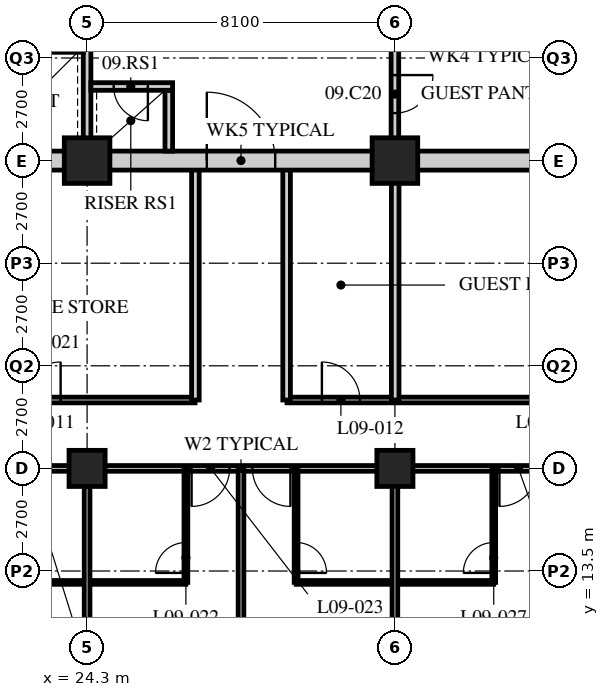
"""IFC4 building model, lengths in metres.
Left out: names, types, materials, properties, quantities, classifications, styles, units other than length and angle.
Written with IfcOpenShell. Run it as: python <this file> out.ifc"""

import sys

from ifc_helpers import new_model, si_unit, direction, frame, frame_2d, origin, origin_2d, place, context, subcontext, project, spatial, rectangle, hollow_rectangle, extrude, element, fill, save


model = new_model("IFC4")
c1 = context("Model", 3, precision=1e-05, world=origin(), true_north=direction((0.0, 1.0)))
c2 = subcontext(c1, "Body", "Model", "MODEL_VIEW")
j1 = project(units=[si_unit("LENGTHUNIT", "METRE"), si_unit("PLANEANGLEUNIT", "RADIAN")], contexts=[c1])
p1 = place(None, origin())
s1 = spatial("IfcSite", under=j1, at=p1, CompositionType="ELEMENT")
p2 = place(p1, origin())
s2 = spatial("IfcBuilding", under=s1, at=p2, CompositionType="ELEMENT")
p3 = place(p2, frame((0.0, 0.0, 43.2)))
s3 = spatial("IfcBuildingStorey", under=s2, at=p3, CompositionType="ELEMENT", Elevation=43.2)
p4 = place(p3, frame((24.3, 16.2, 0.0), z_axis=(0.0, 0.0, 1.0), x_axis=(1.0, 0.0, 0.0)))
e1 = element("IfcColumn", 1, at=p4, inside=s3, PredefinedType="COLUMN", context=c2, shape_type="SweptSolid", body=[
    extrude(hollow_rectangle(XDim=0.95, YDim=0.95, WallThickness=0.095, at=origin_2d()), origin(), (0.0, 0.0, 1.0), 3.4),
])
p5 = place(p3, frame((24.3, 24.3, 0.0), z_axis=(0.0, 0.0, 1.0), x_axis=(1.0, 0.0, 0.0)))
e2 = element("IfcColumn", 2, at=p5, inside=s3, PredefinedType="COLUMN", context=c2, shape_type="SweptSolid", body=[
    extrude(hollow_rectangle(XDim=1.2, YDim=1.2, WallThickness=0.12, at=origin_2d()), origin(), (0.0, 0.0, 1.0), 3.4),
])
p6 = place(p3, frame((32.4, 16.2, 0.0), z_axis=(0.0, 0.0, 1.0), x_axis=(1.0, 0.0, 0.0)))
e3 = element("IfcColumn", 3, at=p6, inside=s3, PredefinedType="COLUMN", context=c2, shape_type="SweptSolid", body=[
    extrude(hollow_rectangle(XDim=0.95, YDim=0.95, WallThickness=0.095, at=origin_2d()), origin(), (0.0, 0.0, 1.0), 3.4),
])
p7 = place(p3, frame((32.4, 24.3, 0.0), z_axis=(0.0, 0.0, 1.0), x_axis=(1.0, 0.0, 0.0)))
e4 = element("IfcColumn", 4, at=p7, inside=s3, PredefinedType="COLUMN", context=c2, shape_type="SweptSolid", body=[
    extrude(hollow_rectangle(XDim=1.2, YDim=1.2, WallThickness=0.12, at=origin_2d()), origin(), (0.0, 0.0, 1.0), 3.4),
])
p8 = place(p3, frame((8.1, 16.2, 0.0), z_axis=(0.0, 0.0, 1.0), x_axis=(1.0, 0.0, 0.0)))
e5 = element("IfcWall", 5, at=p8, inside=s3, PredefinedType="PARTITIONING", context=c2, shape_type="SweptSolid", body=[
    extrude(rectangle(XDim=40.5, YDim=0.15, at=frame_2d((20.25, 0.0))), origin(), (0.0, 0.0, 1.0), 2.578),
])
p9 = place(p8, frame((4.35, 0.0, 0.0)))
e6 = element("IfcOpeningElement", 6, at=p9, cuts=e5, PredefinedType="OPENING", context=c2, shape_type="SweptSolid", body=[
    extrude(rectangle(XDim=1.0, YDim=2.1, at=frame_2d((0.5, 1.05))), frame((0.0, 0.085, 0.0), z_axis=(0.0, -1.0, 0.0), x_axis=(1.0, 0.0, 0.0)), (0.0, 0.0, 1.0), 0.17),
])
p10 = place(p8, frame((10.85, 0.0, 0.0)))
e7 = element("IfcOpeningElement", 7, at=p10, cuts=e5, PredefinedType="OPENING", context=c2, shape_type="SweptSolid", body=[
    extrude(rectangle(XDim=1.0, YDim=2.1, at=frame_2d((0.5, 1.05))), frame((0.0, 0.085, 0.0), z_axis=(0.0, -1.0, 0.0), x_axis=(1.0, 0.0, 0.0)), (0.0, 0.0, 1.0), 0.17),
])
p11 = place(p8, frame((12.75, 0.0, 0.0)))
e8 = element("IfcOpeningElement", 8, at=p11, cuts=e5, PredefinedType="OPENING", context=c2, shape_type="SweptSolid", body=[
    extrude(rectangle(XDim=1.0, YDim=2.1, at=frame_2d((0.5, 1.05))), frame((0.0, 0.085, 0.0), z_axis=(0.0, -1.0, 0.0), x_axis=(1.0, 0.0, 0.0)), (0.0, 0.0, 1.0), 0.17),
])
p12 = place(p8, frame((18.95, 0.0, 0.0)))
e9 = element("IfcOpeningElement", 9, at=p12, cuts=e5, PredefinedType="OPENING", context=c2, shape_type="SweptSolid", body=[
    extrude(rectangle(XDim=1.0, YDim=2.1, at=frame_2d((0.5, 1.05))), frame((0.0, 0.085, 0.0), z_axis=(0.0, -1.0, 0.0), x_axis=(1.0, 0.0, 0.0)), (0.0, 0.0, 1.0), 0.17),
])
p13 = place(p8, frame((20.55, 0.0, 0.0)))
e10 = element("IfcOpeningElement", 10, at=p13, cuts=e5, PredefinedType="OPENING", context=c2, shape_type="SweptSolid", body=[
    extrude(rectangle(XDim=1.0, YDim=2.1, at=frame_2d((0.5, 1.05))), frame((0.0, 0.085, 0.0), z_axis=(0.0, -1.0, 0.0), x_axis=(1.0, 0.0, 0.0)), (0.0, 0.0, 1.0), 0.17),
])
p14 = place(p8, frame((27.05, 0.0, 0.0)))
e11 = element("IfcOpeningElement", 11, at=p14, cuts=e5, PredefinedType="OPENING", context=c2, shape_type="SweptSolid", body=[
    extrude(rectangle(XDim=1.0, YDim=2.1, at=frame_2d((0.5, 1.05))), frame((0.0, 0.085, 0.0), z_axis=(0.0, -1.0, 0.0), x_axis=(1.0, 0.0, 0.0)), (0.0, 0.0, 1.0), 0.17),
])
p15 = place(p8, frame((28.95, 0.0, 0.0)))
e12 = element("IfcOpeningElement", 12, at=p15, cuts=e5, PredefinedType="OPENING", context=c2, shape_type="SweptSolid", body=[
    extrude(rectangle(XDim=1.0, YDim=2.1, at=frame_2d((0.5, 1.05))), frame((0.0, 0.085, 0.0), z_axis=(0.0, -1.0, 0.0), x_axis=(1.0, 0.0, 0.0)), (0.0, 0.0, 1.0), 0.17),
])
p16 = place(p8, frame((34.85, 0.0, 0.0)))
e13 = element("IfcOpeningElement", 13, at=p16, cuts=e5, PredefinedType="OPENING", context=c2, shape_type="SweptSolid", body=[
    extrude(rectangle(XDim=1.0, YDim=2.1, at=frame_2d((0.5, 1.05))), frame((0.0, 0.085, 0.0), z_axis=(0.0, -1.0, 0.0), x_axis=(1.0, 0.0, 0.0)), (0.0, 0.0, 1.0), 0.17),
])
p17 = place(p8, frame((1.525, 0.0, 0.0)))
e14 = element("IfcOpeningElement", 14, at=p17, cuts=e5, PredefinedType="OPENING", context=c2, shape_type="SweptSolid", body=[
    extrude(rectangle(XDim=1.0, YDim=2.1, at=frame_2d((0.5, 1.05))), frame((0.0, 0.085, 0.0), z_axis=(0.0, -1.0, 0.0), x_axis=(1.0, 0.0, 0.0)), (0.0, 0.0, 1.0), 0.17),
])
p18 = place(p8, frame((37.975, 0.0, 0.0)))
e15 = element("IfcOpeningElement", 15, at=p18, cuts=e5, PredefinedType="OPENING", context=c2, shape_type="SweptSolid", body=[
    extrude(rectangle(XDim=1.0, YDim=2.1, at=frame_2d((0.5, 1.05))), frame((0.0, 0.085, 0.0), z_axis=(0.0, -1.0, 0.0), x_axis=(1.0, 0.0, 0.0)), (0.0, 0.0, 1.0), 0.17),
])
p19 = place(p3, frame((9.9, 18.0, 0.0), z_axis=(0.0, 0.0, 1.0), x_axis=(1.0, 0.0, 0.0)))
e16 = element("IfcWall", 16, at=p19, inside=s3, PredefinedType="PARTITIONING", context=c2, shape_type="SweptSolid", body=[
    extrude(rectangle(XDim=17.24, YDim=0.15, at=frame_2d((8.62, 0.0))), origin(), (0.0, 0.0, 1.0), 3.19),
])
p20 = place(p19, frame((0.3, 0.0, 0.0)))
e17 = element("IfcOpeningElement", 17, at=p20, cuts=e16, PredefinedType="OPENING", context=c2, shape_type="SweptSolid", body=[
    extrude(rectangle(XDim=1.0, YDim=2.1, at=frame_2d((0.5, 1.05))), frame((0.0, 0.085, 0.0), z_axis=(0.0, -1.0, 0.0), x_axis=(1.0, 0.0, 0.0)), (0.0, 0.0, 1.0), 0.17),
])
p21 = place(p19, frame((3.45, 0.0, 0.0)))
e18 = element("IfcOpeningElement", 18, at=p21, cuts=e16, PredefinedType="OPENING", context=c2, shape_type="SweptSolid", body=[
    extrude(rectangle(XDim=1.0, YDim=2.1, at=frame_2d((0.5, 1.05))), frame((0.0, 0.085, 0.0), z_axis=(0.0, -1.0, 0.0), x_axis=(1.0, 0.0, 0.0)), (0.0, 0.0, 1.0), 0.17),
])
p22 = place(p19, frame((7.229, 0.0, 0.0)))
e19 = element("IfcOpeningElement", 19, at=p22, cuts=e16, PredefinedType="OPENING", context=c2, shape_type="SweptSolid", body=[
    extrude(rectangle(XDim=1.0, YDim=2.1, at=frame_2d((0.5, 1.05))), frame((0.0, 0.085, 0.0), z_axis=(0.0, -1.0, 0.0), x_axis=(1.0, 0.0, 0.0)), (0.0, 0.0, 1.0), 0.17),
])
p23 = place(p19, frame((12.704, 0.0, 0.0)))
e20 = element("IfcOpeningElement", 20, at=p23, cuts=e16, PredefinedType="OPENING", context=c2, shape_type="SweptSolid", body=[
    extrude(rectangle(XDim=1.0, YDim=2.1, at=frame_2d((0.5, 1.05))), frame((0.0, 0.085, 0.0), z_axis=(0.0, -1.0, 0.0), x_axis=(1.0, 0.0, 0.0)), (0.0, 0.0, 1.0), 0.17),
])
p24 = place(p3, frame((29.56, 18.0, 0.0), z_axis=(0.0, 0.0, 1.0), x_axis=(1.0, 0.0, 0.0)))
e21 = element("IfcWall", 21, at=p24, inside=s3, PredefinedType="PARTITIONING", context=c2, shape_type="SweptSolid", body=[
    extrude(rectangle(XDim=17.24, YDim=0.15, at=frame_2d((8.62, 0.0))), origin(), (0.0, 0.0, 1.0), 3.19),
])
p25 = place(p24, frame((0.919, 0.0, 0.0)))
e22 = element("IfcOpeningElement", 22, at=p25, cuts=e21, PredefinedType="OPENING", context=c2, shape_type="SweptSolid", body=[
    extrude(rectangle(XDim=1.0, YDim=2.1, at=frame_2d((0.5, 1.05))), frame((0.0, 0.085, 0.0), z_axis=(0.0, -1.0, 0.0), x_axis=(1.0, 0.0, 0.0)), (0.0, 0.0, 1.0), 0.17),
])
p26 = place(p24, frame((6.394, 0.0, 0.0)))
e23 = element("IfcOpeningElement", 23, at=p26, cuts=e21, PredefinedType="OPENING", context=c2, shape_type="SweptSolid", body=[
    extrude(rectangle(XDim=1.0, YDim=2.1, at=frame_2d((0.5, 1.05))), frame((0.0, 0.085, 0.0), z_axis=(0.0, -1.0, 0.0), x_axis=(1.0, 0.0, 0.0)), (0.0, 0.0, 1.0), 0.17),
])
p27 = place(p24, frame((11.869, 0.0, 0.0)))
e24 = element("IfcOpeningElement", 24, at=p27, cuts=e21, PredefinedType="OPENING", context=c2, shape_type="SweptSolid", body=[
    extrude(rectangle(XDim=1.0, YDim=2.1, at=frame_2d((0.5, 1.05))), frame((0.0, 0.085, 0.0), z_axis=(0.0, -1.0, 0.0), x_axis=(1.0, 0.0, 0.0)), (0.0, 0.0, 1.0), 0.17),
])
p28 = place(p24, frame((15.019, 0.0, 0.0)))
e25 = element("IfcOpeningElement", 25, at=p28, cuts=e21, PredefinedType="OPENING", context=c2, shape_type="SweptSolid", body=[
    extrude(rectangle(XDim=1.0, YDim=2.1, at=frame_2d((0.5, 1.05))), frame((0.0, 0.085, 0.0), z_axis=(0.0, -1.0, 0.0), x_axis=(1.0, 0.0, 0.0)), (0.0, 0.0, 1.0), 0.17),
])
p29 = place(p3, frame((32.407, 18.0, 0.0), z_axis=(0.0, 0.0, 1.0), x_axis=(0.0, 1.0, 0.0)))
e26 = element("IfcWall", 26, at=p29, inside=s3, PredefinedType="SOLIDWALL", context=c2, shape_type="SweptSolid", body=[
    extrude(rectangle(XDim=6.3, YDim=0.2, at=frame_2d((3.15, 0.0))), origin(), (0.0, 0.0, 1.0), 2.578),
])
for number, where, z_axis, x_axis in (
    (27, (27.15, 18.0, 0.0), (0.0, 0.0, 1.0), (0.0, 1.0, 0.0)),
    (28, (29.55, 18.0, 0.0), (0.0, 0.0, 1.0), (0.0, 1.0, 0.0)),
):
    element("IfcWall", number, at=place(p3, frame(where, z_axis=z_axis, x_axis=x_axis)), inside=s3, PredefinedType="SOLIDWALL", context=c2, shape_type="SweptSolid", body=[
        extrude(rectangle(XDim=6.3, YDim=0.2, at=frame_2d((3.15, 0.0))), origin(), (0.0, 0.0, 1.0), 3.19),
    ])
p30 = place(p3, frame((22.0, 13.2, 0.0), z_axis=(0.0, 0.0, 1.0), x_axis=(1.0, 0.0, 0.0)))
e29 = element("IfcWall", 29, at=p30, inside=s3, PredefinedType="PARTITIONING", context=c2, shape_type="SweptSolid", body=[
    extrude(rectangle(XDim=4.9, YDim=0.1, at=frame_2d((2.45, 0.0))), origin(), (0.0, 0.0, 1.0), 3.19),
])
p31 = place(p3, frame((26.9, 16.2, 0.0), z_axis=(0.0, 0.0, 1.0), x_axis=(0.0, -1.0, 0.0)))
e30 = element("IfcWall", 30, at=p31, inside=s3, PredefinedType="PARTITIONING", context=c2, shape_type="SweptSolid", body=[
    extrude(rectangle(XDim=3.0, YDim=0.1, at=frame_2d((1.5, 0.0))), origin(), (0.0, 0.0, 1.0), 3.19),
])
p32 = place(p31, frame((1.95, 0.0, 0.0)))
e31 = element("IfcOpeningElement", 31, at=p32, cuts=e30, PredefinedType="OPENING", context=c2, shape_type="SweptSolid", body=[
    extrude(rectangle(XDim=0.8, YDim=2.1, at=frame_2d((0.4, 1.05))), frame((0.0, 0.06, 0.0), z_axis=(0.0, -1.0, 0.0), x_axis=(1.0, 0.0, 0.0)), (0.0, 0.0, 1.0), 0.12),
])
p33 = place(p3, frame((24.3, 16.2, 0.0), z_axis=(0.0, 0.0, 1.0), x_axis=(0.0, -1.0, 0.0)))
e32 = element("IfcWall", 32, at=p33, inside=s3, PredefinedType="PARTITIONING", context=c2, shape_type="SweptSolid", body=[
    extrude(rectangle(XDim=15.9, YDim=0.15, at=frame_2d((7.95, 0.0))), origin(), (0.0, 0.0, 1.0), 2.578),
])
p34 = place(p33, frame((8.975, 0.0, 0.0)))
e33 = element("IfcOpeningElement", 33, at=p34, cuts=e32, PredefinedType="OPENING", context=c2, shape_type="SweptSolid", body=[
    extrude(rectangle(XDim=0.85, YDim=2.1, at=frame_2d((0.425, 1.05))), frame((0.0, 0.085, 0.0), z_axis=(0.0, -1.0, 0.0), x_axis=(1.0, 0.0, 0.0)), (0.0, 0.0, 1.0), 0.17),
])
p35 = place(p3, frame((28.35, 16.2, 0.0), z_axis=(0.0, 0.0, 1.0), x_axis=(0.0, -1.0, 0.0)))
e34 = element("IfcWall", 34, at=p35, inside=s3, PredefinedType="PARTITIONING", context=c2, shape_type="SweptSolid", body=[
    extrude(rectangle(XDim=15.9, YDim=0.15, at=frame_2d((7.95, 0.0))), origin(), (0.0, 0.0, 1.0), 3.19),
])
p36 = place(p3, frame((29.8, 13.2, 0.0), z_axis=(0.0, 0.0, 1.0), x_axis=(1.0, 0.0, 0.0)))
e35 = element("IfcWall", 35, at=p36, inside=s3, PredefinedType="PARTITIONING", context=c2, shape_type="SweptSolid", body=[
    extrude(rectangle(XDim=5.2, YDim=0.1, at=frame_2d((2.6, 0.0))), origin(), (0.0, 0.0, 1.0), 3.19),
])
p37 = place(p3, frame((29.8, 16.2, 0.0), z_axis=(0.0, 0.0, 1.0), x_axis=(0.0, -1.0, 0.0)))
e36 = element("IfcWall", 36, at=p37, inside=s3, PredefinedType="PARTITIONING", context=c2, shape_type="SweptSolid", body=[
    extrude(rectangle(XDim=3.0, YDim=0.1, at=frame_2d((1.5, 0.0))), origin(), (0.0, 0.0, 1.0), 3.19),
])
p38 = place(p37, frame((1.95, 0.0, 0.0)))
e37 = element("IfcOpeningElement", 37, at=p38, cuts=e36, PredefinedType="OPENING", context=c2, shape_type="SweptSolid", body=[
    extrude(rectangle(XDim=0.8, YDim=2.1, at=frame_2d((0.4, 1.05))), frame((0.0, 0.06, 0.0), z_axis=(0.0, -1.0, 0.0), x_axis=(1.0, 0.0, 0.0)), (0.0, 0.0, 1.0), 0.12),
])
p39 = place(p3, frame((32.4, 16.2, 0.0), z_axis=(0.0, 0.0, 1.0), x_axis=(0.0, -1.0, 0.0)))
e38 = element("IfcWall", 38, at=p39, inside=s3, PredefinedType="PARTITIONING", context=c2, shape_type="SweptSolid", body=[
    extrude(rectangle(XDim=15.9, YDim=0.15, at=frame_2d((7.95, 0.0))), origin(), (0.0, 0.0, 1.0), 2.578),
])
p40 = place(p3, frame((35.0, 16.2, 0.0), z_axis=(0.0, 0.0, 1.0), x_axis=(0.0, -1.0, 0.0)))
e39 = element("IfcWall", 39, at=p40, inside=s3, PredefinedType="PARTITIONING", context=c2, shape_type="SweptSolid", body=[
    extrude(rectangle(XDim=3.0, YDim=0.1, at=frame_2d((1.5, 0.0))), origin(), (0.0, 0.0, 1.0), 3.19),
])
p41 = place(p40, frame((1.95, 0.0, 0.0)))
e40 = element("IfcOpeningElement", 40, at=p41, cuts=e39, PredefinedType="OPENING", context=c2, shape_type="SweptSolid", body=[
    extrude(rectangle(XDim=0.8, YDim=2.1, at=frame_2d((0.4, 1.05))), frame((0.0, 0.06, 0.0), z_axis=(0.0, -1.0, 0.0), x_axis=(1.0, 0.0, 0.0)), (0.0, 0.0, 1.0), 0.12),
])
p42 = place(p3, frame((15.95, 24.3, 0.0), z_axis=(0.0, 0.0, 1.0), x_axis=(1.0, 0.0, 0.0)))
e41 = element("IfcWall", 41, at=p42, inside=s3, PredefinedType="SOLIDWALL", context=c2, shape_type="SweptSolid", body=[
    extrude(rectangle(XDim=24.8, YDim=0.5, at=frame_2d((12.4, 0.0))), origin(), (0.0, 0.0, 1.0), 2.54),
])
p43 = place(p42, frame((11.5, 0.0, 0.0)))
e42 = element("IfcOpeningElement", 42, at=p43, cuts=e41, PredefinedType="OPENING", context=c2, shape_type="SweptSolid", body=[
    extrude(rectangle(XDim=1.8, YDim=2.4, at=frame_2d((0.9, 1.2))), frame((0.0, 0.26, 0.0), z_axis=(0.0, -1.0, 0.0), x_axis=(1.0, 0.0, 0.0)), (0.0, 0.0, 1.0), 0.52),
])
p44 = place(p3, frame((24.3, 24.55, 0.0), z_axis=(0.0, 0.0, 1.0), x_axis=(0.0, 1.0, 0.0)))
e43 = element("IfcWall", 43, at=p44, inside=s3, PredefinedType="SOLIDWALL", context=c2, shape_type="SweptSolid", body=[
    extrude(rectangle(XDim=7.75, YDim=0.2, at=frame_2d((3.875, 0.0))), origin(), (0.0, 0.0, 1.0), 2.578),
])
p45 = place(p44, frame((4.6, 0.0, 0.0)))
e44 = element("IfcOpeningElement", 44, at=p45, cuts=e43, PredefinedType="OPENING", context=c2, shape_type="SweptSolid", body=[
    extrude(rectangle(XDim=1.2, YDim=2.1, at=frame_2d((0.6, 1.05))), frame((0.0, 0.11, 0.0), z_axis=(0.0, -1.0, 0.0), x_axis=(1.0, 0.0, 0.0)), (0.0, 0.0, 1.0), 0.22),
])
p46 = place(p3, frame((26.45, 24.55, 0.0), z_axis=(0.0, 0.0, 1.0), x_axis=(0.0, 1.0, 0.0)))
e45 = element("IfcWall", 45, at=p46, inside=s3, PredefinedType="SOLIDWALL", context=c2, shape_type="SweptSolid", body=[
    extrude(rectangle(XDim=1.6, YDim=0.2, at=frame_2d((0.8, 0.0))), origin(), (0.0, 0.0, 1.0), 3.19),
])
p47 = place(p3, frame((24.4, 26.25, 0.0), z_axis=(0.0, 0.0, 1.0), x_axis=(1.0, 0.0, 0.0)))
e46 = element("IfcWall", 46, at=p47, inside=s3, PredefinedType="SOLIDWALL", context=c2, shape_type="SweptSolid", body=[
    extrude(rectangle(XDim=2.15, YDim=0.2, at=frame_2d((1.075, 0.0))), origin(), (0.0, 0.0, 1.0), 3.19),
])
p48 = place(p47, frame((0.6, 0.0, 0.0)))
e47 = element("IfcOpeningElement", 47, at=p48, cuts=e46, PredefinedType="OPENING", context=c2, shape_type="SweptSolid", body=[
    extrude(rectangle(XDim=0.9, YDim=2.1, at=frame_2d((0.45, 1.05))), frame((0.0, 0.11, 0.0), z_axis=(0.0, -1.0, 0.0), x_axis=(1.0, 0.0, 0.0)), (0.0, 0.0, 1.0), 0.22),
])
p49 = place(p3, frame((32.4, 24.55, 0.0), z_axis=(0.0, 0.0, 1.0), x_axis=(0.0, 1.0, 0.0)))
e48 = element("IfcWall", 48, at=p49, inside=s3, PredefinedType="PARTITIONING", context=c2, shape_type="SweptSolid", body=[
    extrude(rectangle(XDim=7.75, YDim=0.2, at=frame_2d((3.875, 0.0))), origin(), (0.0, 0.0, 1.0), 2.578),
])
p50 = place(p49, frame((1.0, 0.0, 0.0)))
e49 = element("IfcOpeningElement", 49, at=p50, cuts=e48, PredefinedType="OPENING", context=c2, shape_type="SweptSolid", body=[
    extrude(rectangle(XDim=1.0, YDim=2.1, at=frame_2d((0.5, 1.05))), frame((0.0, 0.11, 0.0), z_axis=(0.0, -1.0, 0.0), x_axis=(1.0, 0.0, 0.0)), (0.0, 0.0, 1.0), 0.22),
])
p51 = place(p49, frame((3.925, 0.0, 0.0)))
e50 = element("IfcOpeningElement", 50, at=p51, cuts=e48, PredefinedType="OPENING", context=c2, shape_type="SweptSolid", body=[
    extrude(rectangle(XDim=1.0, YDim=2.1, at=frame_2d((0.5, 1.05))), frame((0.0, 0.11, 0.0), z_axis=(0.0, -1.0, 0.0), x_axis=(1.0, 0.0, 0.0)), (0.0, 0.0, 1.0), 0.22),
])
p52 = place(p49, frame((6.1, 0.0, 0.0)))
e51 = element("IfcOpeningElement", 51, at=p52, cuts=e48, PredefinedType="OPENING", context=c2, shape_type="SweptSolid", body=[
    extrude(rectangle(XDim=0.9, YDim=2.1, at=frame_2d((0.45, 1.05))), frame((0.0, 0.11, 0.0), z_axis=(0.0, -1.0, 0.0), x_axis=(1.0, 0.0, 0.0)), (0.0, 0.0, 1.0), 0.22),
])
p53 = place(p23, origin())
e52 = element("IfcDoor", 52, at=p53, inside=s3, OperationType="SINGLE_SWING_RIGHT", PredefinedType="DOOR", context=c2, shape_type="SweptSolid", body=[
    extrude(rectangle(XDim=1.0, YDim=2.1, at=frame_2d((0.5, 1.05))), frame((0.0, 0.025, 0.0), z_axis=(0.0, -1.0, 0.0), x_axis=(1.0, 0.0, 0.0)), (0.0, 0.0, 1.0), 0.05),
])
fill(e20, e52)
p54 = place(p25, origin())
e53 = element("IfcDoor", 53, at=p54, inside=s3, OperationType="SINGLE_SWING_LEFT", PredefinedType="DOOR", context=c2, shape_type="SweptSolid", body=[
    extrude(rectangle(XDim=1.0, YDim=2.1, at=frame_2d((0.5, 1.05))), frame((0.0, 0.025, 0.0), z_axis=(0.0, -1.0, 0.0), x_axis=(1.0, 0.0, 0.0)), (0.0, 0.0, 1.0), 0.05),
])
fill(e22, e53)
p55 = place(p32, origin())
e54 = element("IfcDoor", 54, at=p55, inside=s3, OperationType="SINGLE_SWING_LEFT", PredefinedType="DOOR", context=c2, shape_type="SweptSolid", body=[
    extrude(rectangle(XDim=0.8, YDim=2.1, at=frame_2d((0.4, 1.05))), frame((0.0, 0.025, 0.0), z_axis=(0.0, -1.0, 0.0), x_axis=(1.0, 0.0, 0.0)), (0.0, 0.0, 1.0), 0.05),
])
fill(e31, e54)
p56 = place(p12, origin())
e55 = element("IfcDoor", 55, at=p56, inside=s3, OperationType="SINGLE_SWING_RIGHT", PredefinedType="DOOR", context=c2, shape_type="SweptSolid", body=[
    extrude(rectangle(XDim=1.0, YDim=2.1, at=frame_2d((0.5, 1.05))), frame((0.0, 0.025, 0.0), z_axis=(0.0, -1.0, 0.0), x_axis=(1.0, 0.0, 0.0)), (0.0, 0.0, 1.0), 0.05),
])
fill(e9, e55)
p57 = place(p38, origin())
e56 = element("IfcDoor", 56, at=p57, inside=s3, OperationType="SINGLE_SWING_RIGHT", PredefinedType="DOOR", context=c2, shape_type="SweptSolid", body=[
    extrude(rectangle(XDim=0.8, YDim=2.1, at=frame_2d((0.4, 1.05))), frame((0.0, 0.025, 0.0), z_axis=(0.0, -1.0, 0.0), x_axis=(1.0, 0.0, 0.0)), (0.0, 0.0, 1.0), 0.05),
])
fill(e37, e56)
p58 = place(p13, origin())
e57 = element("IfcDoor", 57, at=p58, inside=s3, OperationType="SINGLE_SWING_LEFT", PredefinedType="DOOR", context=c2, shape_type="SweptSolid", body=[
    extrude(rectangle(XDim=1.0, YDim=2.1, at=frame_2d((0.5, 1.05))), frame((0.0, 0.025, 0.0), z_axis=(0.0, -1.0, 0.0), x_axis=(1.0, 0.0, 0.0)), (0.0, 0.0, 1.0), 0.05),
])
fill(e10, e57)
p59 = place(p41, origin())
e58 = element("IfcDoor", 58, at=p59, inside=s3, OperationType="SINGLE_SWING_LEFT", PredefinedType="DOOR", context=c2, shape_type="SweptSolid", body=[
    extrude(rectangle(XDim=0.8, YDim=2.1, at=frame_2d((0.4, 1.05))), frame((0.0, 0.025, 0.0), z_axis=(0.0, -1.0, 0.0), x_axis=(1.0, 0.0, 0.0)), (0.0, 0.0, 1.0), 0.05),
])
fill(e40, e58)
p60 = place(p14, origin())
e59 = element("IfcDoor", 59, at=p60, inside=s3, OperationType="SINGLE_SWING_RIGHT", PredefinedType="DOOR", context=c2, shape_type="SweptSolid", body=[
    extrude(rectangle(XDim=1.0, YDim=2.1, at=frame_2d((0.5, 1.05))), frame((0.0, 0.025, 0.0), z_axis=(0.0, -1.0, 0.0), x_axis=(1.0, 0.0, 0.0)), (0.0, 0.0, 1.0), 0.05),
])
fill(e11, e59)
p61 = place(p50, origin())
e60 = element("IfcDoor", 60, at=p61, inside=s3, OperationType="SINGLE_SWING_LEFT", PredefinedType="DOOR", context=c2, shape_type="SweptSolid", body=[
    extrude(rectangle(XDim=1.0, YDim=2.1, at=frame_2d((0.5, 1.05))), frame((0.0, 0.025, 0.0), z_axis=(0.0, -1.0, 0.0), x_axis=(1.0, 0.0, 0.0)), (0.0, 0.0, 1.0), 0.05),
])
fill(e49, e60)
p62 = place(p48, origin())
e61 = element("IfcDoor", 61, at=p62, inside=s3, OperationType="SINGLE_SWING_LEFT", PredefinedType="DOOR", context=c2, shape_type="SweptSolid", body=[
    extrude(rectangle(XDim=0.9, YDim=2.1, at=frame_2d((0.45, 1.05))), frame((0.0, 0.025, 0.0), z_axis=(0.0, -1.0, 0.0), x_axis=(1.0, 0.0, 0.0)), (0.0, 0.0, 1.0), 0.05),
])
fill(e47, e61)
p63 = place(p43, origin())
e62 = element("IfcDoor", 62, at=p63, inside=s3, OperationType="DOUBLE_DOOR_SINGLE_SWING", PredefinedType="DOOR", context=c2, shape_type="SweptSolid", body=[
    extrude(rectangle(XDim=1.8, YDim=2.4, at=frame_2d((0.9, 1.2))), frame((0.0, 0.025, 0.0), z_axis=(0.0, -1.0, 0.0), x_axis=(1.0, 0.0, 0.0)), (0.0, 0.0, 1.0), 0.05),
])
fill(e42, e62)
save(model, sys.argv[1])
